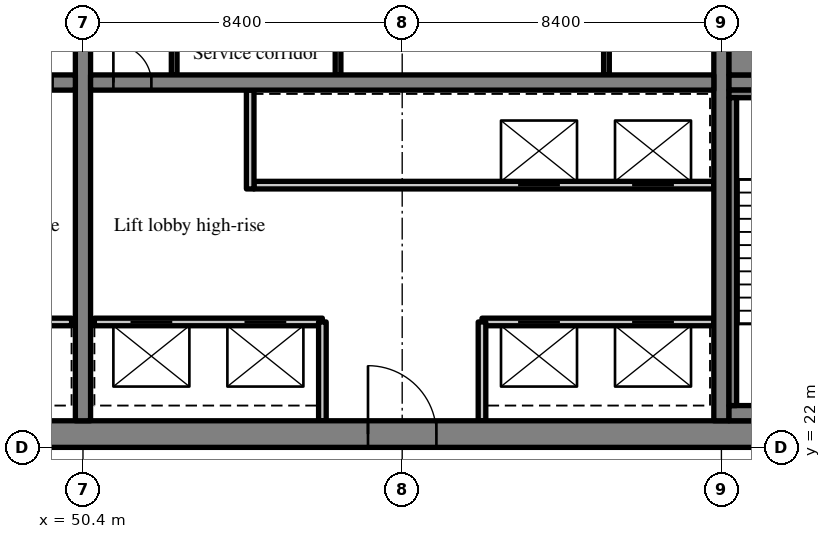
"""IFC4 building model, lengths in metres.
Left out: names, types, materials, properties, quantities, classifications, styles, units other than length and angle.
Written with IfcOpenShell. Run it as: python <this file> out.ifc"""

import sys

from ifc_helpers import new_model, si_unit, direction, frame, frame_2d, origin, place, context, subcontext, project, spatial, rectangle, extrude, source, transform, mapped, element, fill, save


model = new_model("IFC4")
c1 = context("Model", 3, precision=1e-05, world=origin(), true_north=direction((0.0, 1.0)))
c2 = subcontext(c1, "Body", "Model", "MODEL_VIEW")
j1 = project(units=[si_unit("LENGTHUNIT", "METRE"), si_unit("PLANEANGLEUNIT", "RADIAN")], contexts=[c1])
p1 = place(None, origin())
s1 = spatial("IfcSite", under=j1, at=p1, CompositionType="ELEMENT")
p2 = place(p1, origin())
s2 = spatial("IfcBuilding", under=s1, at=p2, CompositionType="ELEMENT")
p3 = place(p2, frame((0.0, 0.0, 146.2)))
s3 = spatial("IfcBuildingStorey", under=s2, at=p3, CompositionType="ELEMENT", Elevation=146.2)
m1 = source(origin(), c2, "Body", "SweptSolid", [
    extrude(rectangle(XDim=50.4, YDim=0.7, at=frame_2d((25.2, 0.0))), origin(), (0.0, 0.0, 1.0), 5.12),
])
p4 = place(p3, frame((25.2, 22.35, 0.0), z_axis=(0.0, 0.0, 1.0), x_axis=(1.0, 0.0, 0.0)))
e1 = element("IfcWall", 1, at=p4, inside=s3, PredefinedType="SHEAR", context=c2, shape_type="MappedRepresentation", body=[
    mapped(m1, transform((0.0, 0.0, 0.0), scale=1.0)),
])
m2 = source(origin(), c2, "Body", "SweptSolid", [
    extrude(rectangle(XDim=1.8, YDim=2.1, at=frame_2d((0.9, 1.05))), frame((0.0, 0.36, 0.0), z_axis=(0.0, -1.0, 0.0), x_axis=(1.0, 0.0, 0.0)), (0.0, 0.0, 1.0), 0.72),
])
p5 = place(p4, frame((15.9, 0.0, 0.0)))
e2 = element("IfcOpeningElement", 2, at=p5, cuts=e1, PredefinedType="OPENING", context=c2, shape_type="MappedRepresentation", body=[
    mapped(m2, transform((0.0, 0.0, 0.0), scale=1.0)),
])
p6 = place(p4, frame((32.7, 0.0, 0.0)))
e3 = element("IfcOpeningElement", 3, at=p6, cuts=e1, PredefinedType="OPENING", context=c2, shape_type="MappedRepresentation", body=[
    mapped(m2, transform((0.0, 0.0, 0.0), scale=1.0)),
])
m3 = source(origin(), c2, "Body", "SweptSolid", [
    extrude(rectangle(XDim=1.2, YDim=2.1, at=frame_2d((0.6, 1.05))), frame((0.0, 0.36, 0.0), z_axis=(0.0, -1.0, 0.0), x_axis=(1.0, 0.0, 0.0)), (0.0, 0.0, 1.0), 0.72),
])
p7 = place(p4, frame((6.475, 0.0, 0.0)))
e4 = element("IfcOpeningElement", 4, at=p7, cuts=e1, PredefinedType="OPENING", context=c2, shape_type="MappedRepresentation", body=[
    mapped(m3, transform((0.0, 0.0, 0.0), scale=1.0)),
])
p8 = place(p4, frame((47.875, 0.0, 0.0)))
e5 = element("IfcOpeningElement", 5, at=p8, cuts=e1, PredefinedType="OPENING", context=c2, shape_type="MappedRepresentation", body=[
    mapped(m3, transform((0.0, 0.0, 0.0), scale=1.0)),
])
m4 = source(origin(), c2, "Body", "SweptSolid", [
    extrude(rectangle(XDim=18.6, YDim=0.4, at=frame_2d((9.3, 0.0))), origin(), (0.0, 0.0, 1.0), 5.12),
])
p9 = place(p3, frame((50.4, 22.7, 0.0), z_axis=(0.0, 0.0, 1.0), x_axis=(0.0, 1.0, 0.0)))
e6 = element("IfcWall", 6, at=p9, inside=s3, PredefinedType="SHEAR", context=c2, shape_type="MappedRepresentation", body=[
    mapped(m4, transform((0.0, 0.0, 0.0), scale=1.0)),
])
m5 = source(origin(), c2, "Body", "SweptSolid", [
    extrude(rectangle(XDim=1.1, YDim=2.1, at=frame_2d((0.55, 1.05))), frame((0.0, 0.21, 0.0), z_axis=(0.0, -1.0, 0.0), x_axis=(1.0, 0.0, 0.0)), (0.0, 0.0, 1.0), 0.42),
])
p10 = place(p9, frame((12.75, 0.0, 0.0)))
e7 = element("IfcOpeningElement", 7, at=p10, cuts=e6, PredefinedType="OPENING", context=c2, shape_type="MappedRepresentation", body=[
    mapped(m5, transform((0.0, 0.0, 0.0), scale=1.0)),
])
p11 = place(p3, frame((67.2, 22.7, 0.0), z_axis=(0.0, 0.0, 1.0), x_axis=(0.0, 1.0, 0.0)))
e8 = element("IfcWall", 8, at=p11, inside=s3, PredefinedType="SHEAR", context=c2, shape_type="MappedRepresentation", body=[
    mapped(m4, transform((0.0, 0.0, 0.0), scale=1.0)),
])
m6 = source(origin(), c2, "Body", "SweptSolid", [
    extrude(rectangle(XDim=16.4, YDim=0.4, at=frame_2d((8.2, 0.0))), origin(), (0.0, 0.0, 1.0), 5.12),
])
p12 = place(p3, frame((33.8, 31.6, 0.0), z_axis=(0.0, 0.0, 1.0), x_axis=(1.0, 0.0, 0.0)))
e9 = element("IfcWall", 9, at=p12, inside=s3, PredefinedType="SHEAR", context=c2, shape_type="MappedRepresentation", body=[
    mapped(m6, transform((0.0, 0.0, 0.0), scale=1.0)),
])
m7 = source(origin(), c2, "Body", "SweptSolid", [
    extrude(rectangle(XDim=1.0, YDim=2.1, at=frame_2d((0.5, 1.05))), frame((0.0, 0.21, 0.0), z_axis=(0.0, -1.0, 0.0), x_axis=(1.0, 0.0, 0.0)), (0.0, 0.0, 1.0), 0.42),
])
p13 = place(p12, frame((14.8, 0.0, 0.0)))
e10 = element("IfcOpeningElement", 10, at=p13, cuts=e9, PredefinedType="OPENING", context=c2, shape_type="MappedRepresentation", body=[
    mapped(m7, transform((0.0, 0.0, 0.0), scale=1.0)),
])
p14 = place(p3, frame((50.6, 31.6, 0.0), z_axis=(0.0, 0.0, 1.0), x_axis=(1.0, 0.0, 0.0)))
e11 = element("IfcWall", 11, at=p14, inside=s3, PredefinedType="SHEAR", context=c2, shape_type="MappedRepresentation", body=[
    mapped(m6, transform((0.0, 0.0, 0.0), scale=1.0)),
])
p15 = place(p14, frame((0.6, 0.0, 0.0)))
e12 = element("IfcOpeningElement", 12, at=p15, cuts=e11, PredefinedType="OPENING", context=c2, shape_type="MappedRepresentation", body=[
    mapped(m7, transform((0.0, 0.0, 0.0), scale=1.0)),
])
m8 = source(origin(), c2, "Body", "SweptSolid", [
    extrude(rectangle(XDim=7.5, YDim=0.4, at=frame_2d((3.75, 0.0))), origin(), (0.0, 0.0, 1.0), 5.12),
])
p16 = place(p3, frame((67.4, 31.6, 0.0), z_axis=(0.0, 0.0, 1.0), x_axis=(1.0, 0.0, 0.0)))
e13 = element("IfcWall", 13, at=p16, inside=s3, PredefinedType="SHEAR", context=c2, shape_type="MappedRepresentation", body=[
    mapped(m8, transform((0.0, 0.0, 0.0), scale=1.0)),
])
p17 = place(p16, frame((5.725, 0.0, 0.0)))
e14 = element("IfcOpeningElement", 14, at=p17, cuts=e13, PredefinedType="OPENING", context=c2, shape_type="MappedRepresentation", body=[
    mapped(m5, transform((0.0, 0.0, 0.0), scale=1.0)),
])
m9 = source(origin(), c2, "Body", "SweptSolid", [
    extrude(rectangle(XDim=6.0, YDim=0.2, at=frame_2d((3.0, 0.0))), origin(), (0.0, 0.0, 1.0), 5.12),
])
p18 = place(p3, frame((44.1, 25.3, 0.0), z_axis=(0.0, 0.0, 1.0), x_axis=(1.0, 0.0, 0.0)))
e15 = element("IfcWall", 15, at=p18, inside=s3, PredefinedType="SOLIDWALL", context=c2, shape_type="MappedRepresentation", body=[
    mapped(m9, transform((0.0, 0.0, 0.0), scale=1.0)),
])
m10 = source(origin(), c2, "Body", "SweptSolid", [
    extrude(rectangle(XDim=1.1, YDim=2.1, at=frame_2d((0.55, 1.05))), frame((0.0, 0.11, 0.0), z_axis=(0.0, -1.0, 0.0), x_axis=(1.0, 0.0, 0.0)), (0.0, 0.0, 1.0), 0.22),
])
p19 = place(p18, frame((0.95, 0.0, 0.0)))
e16 = element("IfcOpeningElement", 16, at=p19, cuts=e15, PredefinedType="OPENING", context=c2, shape_type="MappedRepresentation", body=[
    mapped(m10, transform((0.0, 0.0, 0.0), scale=1.0)),
])
p20 = place(p18, frame((3.95, 0.0, 0.0)))
e17 = element("IfcOpeningElement", 17, at=p20, cuts=e15, PredefinedType="OPENING", context=c2, shape_type="MappedRepresentation", body=[
    mapped(m10, transform((0.0, 0.0, 0.0), scale=1.0)),
])
m11 = source(origin(), c2, "Body", "SweptSolid", [
    extrude(rectangle(XDim=6.1, YDim=0.2, at=frame_2d((3.05, 0.0))), origin(), (0.0, 0.0, 1.0), 5.12),
])
p21 = place(p3, frame((67.0, 25.3, 0.0), z_axis=(0.0, 0.0, 1.0), x_axis=(-1.0, 0.0, 0.0)))
e18 = element("IfcWall", 18, at=p21, inside=s3, PredefinedType="SOLIDWALL", context=c2, shape_type="MappedRepresentation", body=[
    mapped(m11, transform((0.0, 0.0, 0.0), scale=1.0)),
])
p22 = place(p21, frame((1.05, 0.0, 0.0)))
e19 = element("IfcOpeningElement", 19, at=p22, cuts=e18, PredefinedType="OPENING", context=c2, shape_type="MappedRepresentation", body=[
    mapped(m10, transform((0.0, 0.0, 0.0), scale=1.0)),
])
p23 = place(p21, frame((4.05, 0.0, 0.0)))
e20 = element("IfcOpeningElement", 20, at=p23, cuts=e18, PredefinedType="OPENING", context=c2, shape_type="MappedRepresentation", body=[
    mapped(m10, transform((0.0, 0.0, 0.0), scale=1.0)),
])
p24 = place(p3, frame((56.7, 25.3, 0.0), z_axis=(0.0, 0.0, 1.0), x_axis=(-1.0, 0.0, 0.0)))
e21 = element("IfcWall", 21, at=p24, inside=s3, PredefinedType="SOLIDWALL", context=c2, shape_type="MappedRepresentation", body=[
    mapped(m9, transform((0.0, 0.0, 0.0), scale=1.0)),
])
p25 = place(p24, frame((0.95, 0.0, 0.0)))
e22 = element("IfcOpeningElement", 22, at=p25, cuts=e21, PredefinedType="OPENING", context=c2, shape_type="MappedRepresentation", body=[
    mapped(m10, transform((0.0, 0.0, 0.0), scale=1.0)),
])
p26 = place(p24, frame((3.95, 0.0, 0.0)))
e23 = element("IfcOpeningElement", 23, at=p26, cuts=e21, PredefinedType="OPENING", context=c2, shape_type="MappedRepresentation", body=[
    mapped(m10, transform((0.0, 0.0, 0.0), scale=1.0)),
])
m12 = source(origin(), c2, "Body", "SweptSolid", [
    extrude(rectangle(XDim=12.1, YDim=0.2, at=frame_2d((6.05, 0.0))), origin(), (0.0, 0.0, 1.0), 5.12),
])
p27 = place(p3, frame((67.0, 28.9, 0.0), z_axis=(0.0, 0.0, 1.0), x_axis=(-1.0, 0.0, 0.0)))
e24 = element("IfcWall", 24, at=p27, inside=s3, PredefinedType="SOLIDWALL", context=c2, shape_type="MappedRepresentation", body=[
    mapped(m12, transform((0.0, 0.0, 0.0), scale=1.0)),
])
p28 = place(p27, frame((1.05, 0.0, 0.0)))
e25 = element("IfcOpeningElement", 25, at=p28, cuts=e24, PredefinedType="OPENING", context=c2, shape_type="MappedRepresentation", body=[
    mapped(m10, transform((0.0, 0.0, 0.0), scale=1.0)),
])
p29 = place(p27, frame((4.05, 0.0, 0.0)))
e26 = element("IfcOpeningElement", 26, at=p29, cuts=e24, PredefinedType="OPENING", context=c2, shape_type="MappedRepresentation", body=[
    mapped(m10, transform((0.0, 0.0, 0.0), scale=1.0)),
])
m13 = source(origin(), c2, "Body", "SweptSolid", [
    extrude(rectangle(XDim=2.6, YDim=0.2, at=frame_2d((1.3, 0.0))), origin(), (0.0, 0.0, 1.0), 5.12),
])
for number, where, z_axis, x_axis in (
    (27, (60.9, 22.7, 0.0), (0.0, 0.0, 1.0), (0.0, 1.0, 0.0)),
    (28, (56.7, 22.7, 0.0), (0.0, 0.0, 1.0), (0.0, 1.0, 0.0)),
):
    element("IfcWall", number, at=place(p3, frame(where, z_axis=z_axis, x_axis=x_axis)), inside=s3, PredefinedType="SOLIDWALL", context=c2, shape_type="MappedRepresentation", body=[
        mapped(m13, transform((0.0, 0.0, 0.0), scale=1.0)),
    ])
m14 = source(origin(), c2, "Body", "SweptSolid", [
    extrude(rectangle(XDim=2.6, YDim=0.2, at=frame_2d((1.3, 0.0))), origin(), (0.0, 0.0, 1.0), 5.12),
])
p30 = place(p3, frame((54.8, 28.8, 0.0), z_axis=(0.0, 0.0, 1.0), x_axis=(0.0, 1.0, 0.0)))
e29 = element("IfcWall", 29, at=p30, inside=s3, PredefinedType="SOLIDWALL", context=c2, shape_type="MappedRepresentation", body=[
    mapped(m14, transform((0.0, 0.0, 0.0), scale=1.0)),
])
m15 = source(origin(), c2, "Body", "SweptSolid", [
    extrude(rectangle(XDim=3.2, YDim=0.15, at=frame_2d((1.6, 0.0))), origin(), (0.0, 0.0, 1.0), 5.12),
])
for number, where, z_axis, x_axis in (
    (30, (52.8, 31.8, 0.0), (0.0, 0.0, 1.0), (0.0, 1.0, 0.0)),
    (31, (64.175, 31.8, 0.0), (0.0, 0.0, 1.0), (0.0, 1.0, 0.0)),
    (32, (57.112, 31.8, 0.0), (0.0, 0.0, 1.0), (0.0, 1.0, 0.0)),
):
    element("IfcWall", number, at=place(p3, frame(where, z_axis=z_axis, x_axis=x_axis)), inside=s3, PredefinedType="PARTITIONING", context=c2, shape_type="MappedRepresentation", body=[
        mapped(m15, transform((0.0, 0.0, 0.0), scale=1.0)),
    ])
m16 = source(origin(), c2, "Body", "SweptSolid", [
    extrude(rectangle(XDim=4.85, YDim=0.4, at=frame_2d((2.425, 0.0))), origin(), (0.0, 0.0, 1.0), 5.12),
])
p31 = place(p3, frame((67.4, 22.9, 0.0), z_axis=(0.0, 0.0, 1.0), x_axis=(1.0, 0.0, 0.0)))
e33 = element("IfcWall", 33, at=p31, inside=s3, PredefinedType="SOLIDWALL", context=c2, shape_type="MappedRepresentation", body=[
    mapped(m16, transform((0.0, 0.0, 0.0), scale=1.0)),
])
m17 = source(origin(), c2, "Body", "SweptSolid", [
    extrude(rectangle(XDim=4.85, YDim=0.2, at=frame_2d((2.425, 0.0))), origin(), (0.0, 0.0, 1.0), 5.12),
])
p32 = place(p3, frame((67.4, 31.3, 0.0), z_axis=(0.0, 0.0, 1.0), x_axis=(1.0, 0.0, 0.0)))
e34 = element("IfcWall", 34, at=p32, inside=s3, PredefinedType="SOLIDWALL", context=c2, shape_type="MappedRepresentation", body=[
    mapped(m17, transform((0.0, 0.0, 0.0), scale=1.0)),
])
m18 = source(origin(), c2, "Body", "SweptSolid", [
    extrude(rectangle(XDim=8.1, YDim=0.2, at=frame_2d((4.05, 0.0))), origin(), (0.0, 0.0, 1.0), 5.12),
])
p33 = place(p3, frame((67.5, 23.1, 0.0), z_axis=(0.0, 0.0, 1.0), x_axis=(0.0, 1.0, 0.0)))
e35 = element("IfcWall", 35, at=p33, inside=s3, PredefinedType="SOLIDWALL", context=c2, shape_type="MappedRepresentation", body=[
    mapped(m18, transform((0.0, 0.0, 0.0), scale=1.0)),
])
m19 = source(origin(), c2, "Body", "SweptSolid", [
    extrude(rectangle(XDim=4.85, YDim=1.0, at=frame_2d((2.425, 0.0))), origin(), (0.0, 0.0, 1.0), 5.12),
])
p34 = place(p3, frame((67.4, 32.3, 0.0), z_axis=(0.0, 0.0, 1.0), x_axis=(1.0, 0.0, 0.0)))
e36 = element("IfcWall", 36, at=p34, inside=s3, PredefinedType="SOLIDWALL", context=c2, shape_type="MappedRepresentation", body=[
    mapped(m19, transform((0.0, 0.0, 0.0), scale=1.0)),
])
m20 = source(origin(), c2, "Body", "SweptSolid", [
    extrude(rectangle(XDim=1.8, YDim=2.1, at=frame_2d((0.9, 1.05))), frame((0.0, 0.275, 0.0), z_axis=(0.0, -1.0, 0.0), x_axis=(1.0, 0.0, 0.0)), (0.0, 0.0, 1.0), 0.05),
])
p35 = place(p6, origin())
e37 = element("IfcDoor", 37, at=p35, inside=s3, OperationType="DOUBLE_DOOR_SINGLE_SWING", PredefinedType="DOOR", context=c2, shape_type="MappedRepresentation", body=[
    mapped(m20, transform((0.0, 0.0, 0.0), scale=1.0)),
])
fill(e3, e37)
m21 = source(origin(), c2, "Body", "SweptSolid", [
    extrude(rectangle(XDim=1.0, YDim=2.1, at=frame_2d((0.5, 1.05))), frame((0.0, 0.025, 0.0), z_axis=(0.0, -1.0, 0.0), x_axis=(1.0, 0.0, 0.0)), (0.0, 0.0, 1.0), 0.05),
])
p36 = place(p15, origin())
e38 = element("IfcDoor", 38, at=p36, inside=s3, OperationType="SINGLE_SWING_LEFT", PredefinedType="DOOR", context=c2, shape_type="MappedRepresentation", body=[
    mapped(m21, transform((0.0, 0.0, 0.0), scale=1.0)),
])
fill(e12, e38)
m22 = source(origin(), c2, "Body", "SweptSolid", [
    extrude(rectangle(XDim=1.1, YDim=2.1, at=frame_2d((0.55, 1.05))), frame((0.0, 0.025, 0.0), z_axis=(0.0, -1.0, 0.0), x_axis=(1.0, 0.0, 0.0)), (0.0, 0.0, 1.0), 0.05),
])
p37 = place(p22, origin())
e39 = element("IfcDoor", 39, at=p37, inside=s3, OperationType="SLIDING_TO_LEFT", PredefinedType="DOOR", context=c2, shape_type="MappedRepresentation", body=[
    mapped(m22, transform((0.0, 0.0, 0.0), scale=1.0)),
])
fill(e19, e39)
p38 = place(p23, origin())
e40 = element("IfcDoor", 40, at=p38, inside=s3, OperationType="SLIDING_TO_RIGHT", PredefinedType="DOOR", context=c2, shape_type="MappedRepresentation", body=[
    mapped(m22, transform((0.0, 0.0, 0.0), scale=1.0)),
])
fill(e20, e40)
p39 = place(p25, origin())
e41 = element("IfcDoor", 41, at=p39, inside=s3, OperationType="SLIDING_TO_LEFT", PredefinedType="DOOR", context=c2, shape_type="MappedRepresentation", body=[
    mapped(m22, transform((0.0, 0.0, 0.0), scale=1.0)),
])
fill(e22, e41)
p40 = place(p26, origin())
e42 = element("IfcDoor", 42, at=p40, inside=s3, OperationType="SLIDING_TO_RIGHT", PredefinedType="DOOR", context=c2, shape_type="MappedRepresentation", body=[
    mapped(m22, transform((0.0, 0.0, 0.0), scale=1.0)),
])
fill(e23, e42)
p41 = place(p28, origin())
e43 = element("IfcDoor", 43, at=p41, inside=s3, OperationType="SLIDING_TO_LEFT", PredefinedType="DOOR", context=c2, shape_type="MappedRepresentation", body=[
    mapped(m22, transform((0.0, 0.0, 0.0), scale=1.0)),
])
fill(e25, e43)
p42 = place(p29, origin())
e44 = element("IfcDoor", 44, at=p42, inside=s3, OperationType="SLIDING_TO_RIGHT", PredefinedType="DOOR", context=c2, shape_type="MappedRepresentation", body=[
    mapped(m22, transform((0.0, 0.0, 0.0), scale=1.0)),
])
fill(e26, e44)
save(model, sys.argv[1])
